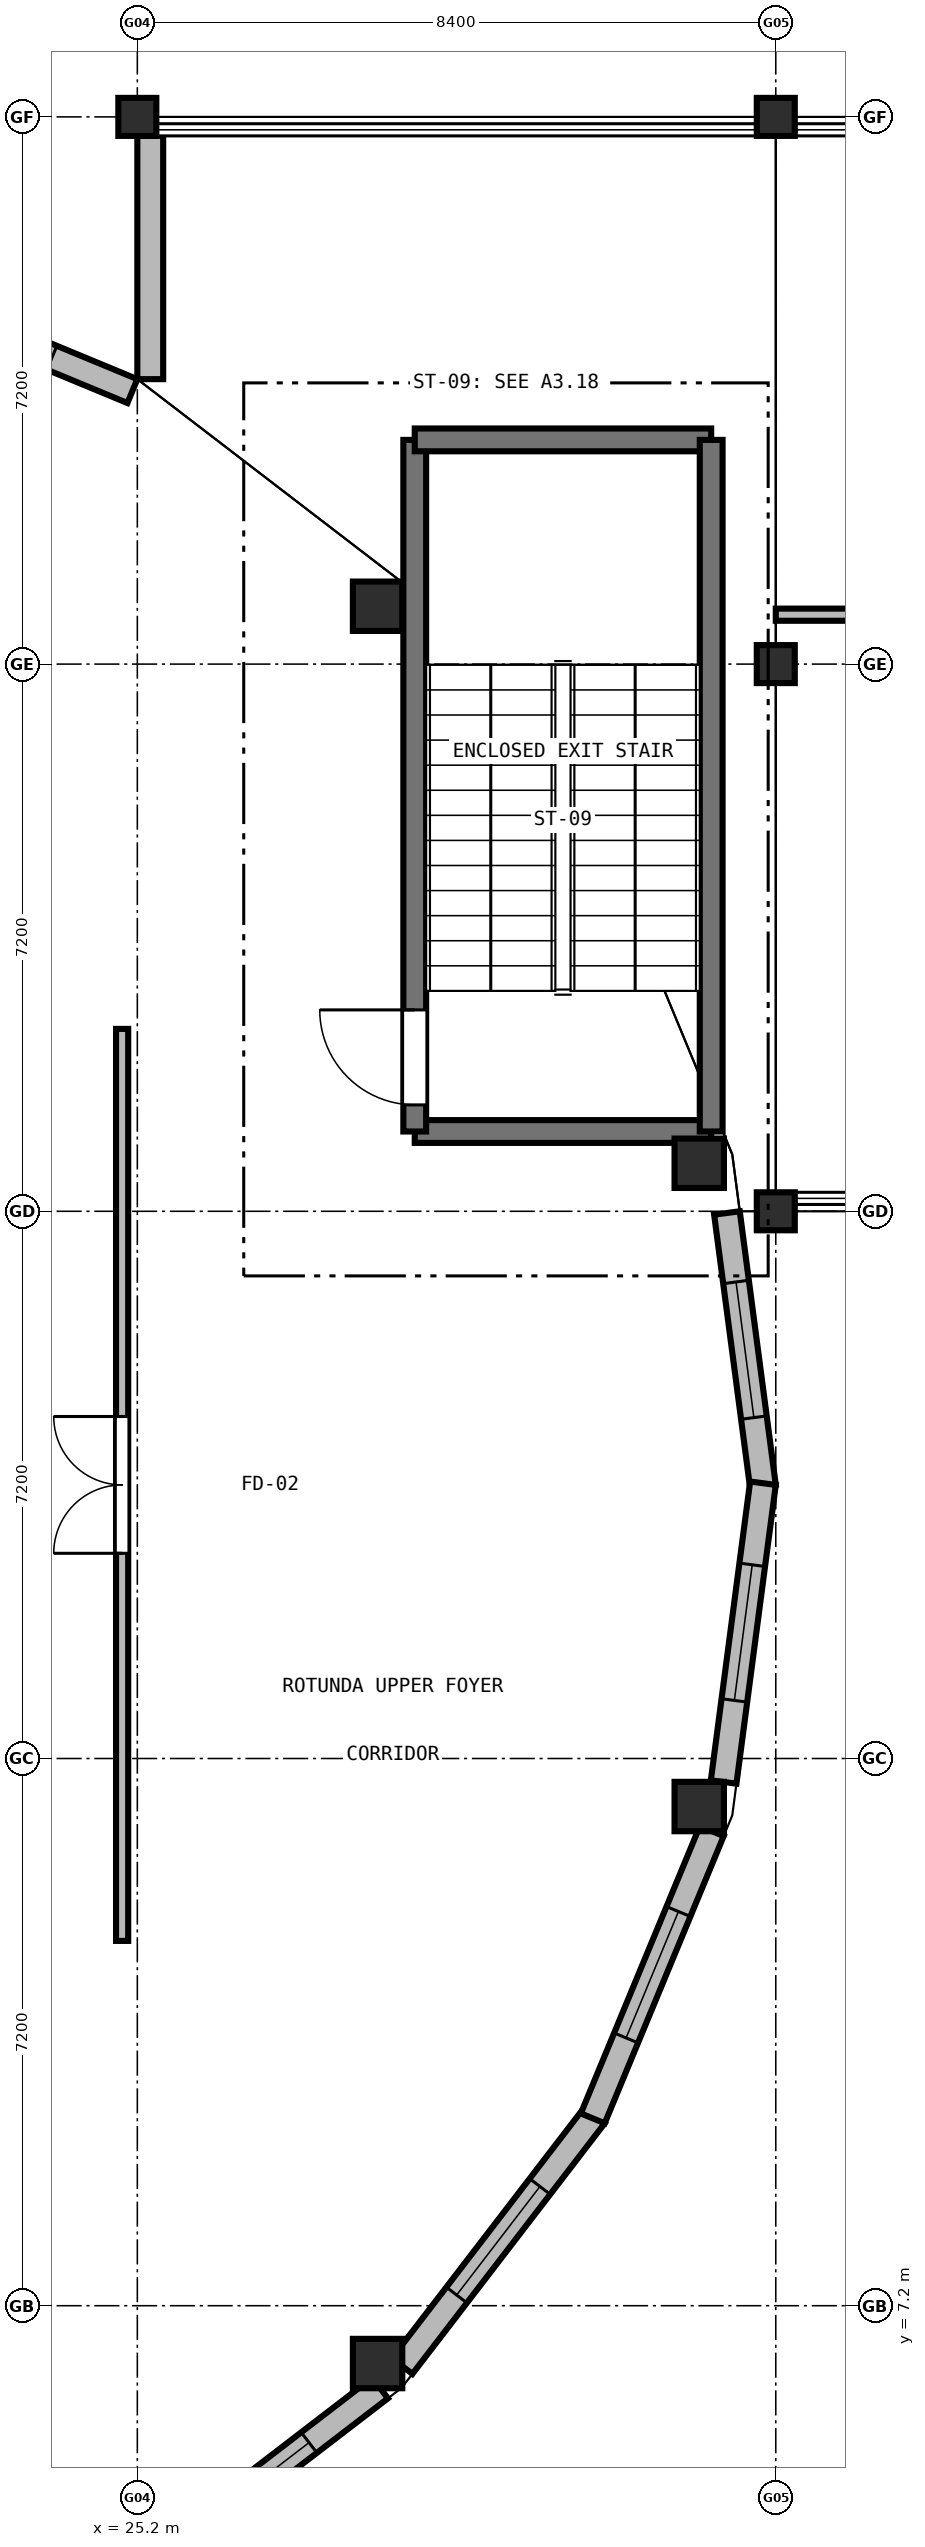
"""IFC4 building model, lengths in metres.
Left out: names, types, materials, properties, quantities, classifications, styles, units other than length and angle.
Written with IfcOpenShell. Run it as: python <this file> out.ifc"""

import sys

from ifc_helpers import new_model, si_unit, direction, frame, frame_2d, origin, origin_2d, place, context, subcontext, project, spatial, rectangle, circle, extrude, element, fill, save


model = new_model("IFC4")
c1 = context("Model", 3, precision=1e-05, world=origin(), true_north=direction((0.0, 1.0)))
c2 = subcontext(c1, "Body", "Model", "MODEL_VIEW")
j1 = project(units=[si_unit("LENGTHUNIT", "METRE"), si_unit("PLANEANGLEUNIT", "RADIAN")], contexts=[c1])
p1 = place(None, origin())
s1 = spatial("IfcSite", under=j1, at=p1, CompositionType="ELEMENT")
p2 = place(p1, origin())
s2 = spatial("IfcBuilding", under=s1, at=p2, CompositionType="ELEMENT")
p3 = place(p2, frame((0.0, 0.0, 5.1)))
s3 = spatial("IfcBuildingStorey", under=s2, at=p3, CompositionType="ELEMENT", Elevation=5.1)
p4 = place(p3, frame((25.2, 36.0, 0.0), z_axis=(0.0, 0.0, 1.0), x_axis=(1.0, 0.0, 0.0)))
e1 = element("IfcColumn", 1, at=p4, inside=s3, PredefinedType="COLUMN", context=c2, shape_type="SweptSolid", body=[
    extrude(rectangle(XDim=0.5, YDim=0.5, at=origin_2d()), origin(), (0.0, 0.0, 1.0), 4.2),
])
for number, where, z_axis, x_axis in (
    (2, (28.361, 6.439, 0.0), (0.0, 0.0, 1.0), (1.0, 0.0, 0.0)),
    (3, (28.361, 29.561, 0.0), (0.0, 0.0, 1.0), (1.0, 0.0, 0.0)),
    (4, (32.593, 13.768, 0.0), (0.0, 0.0, 1.0), (1.0, 0.0, 0.0)),
    (5, (32.593, 22.232, 0.0), (0.0, 0.0, 1.0), (1.0, 0.0, 0.0)),
):
    element("IfcColumn", number, at=place(p3, frame(where, z_axis=z_axis, x_axis=x_axis)), inside=s3, PredefinedType="COLUMN", context=c2, shape_type="SweptSolid", body=[
        extrude(circle(Radius=0.325, at=origin_2d()), origin(), (0.0, 0.0, 1.0), 4.2),
    ])
for number, where, z_axis, x_axis in (
    (6, (33.6, 21.6, 0.0), (0.0, 0.0, 1.0), (1.0, 0.0, 0.0)),
    (7, (33.6, 28.8, 0.0), (0.0, 0.0, 1.0), (1.0, 0.0, 0.0)),
    (8, (33.6, 36.0, 0.0), (0.0, 0.0, 1.0), (1.0, 0.0, 0.0)),
):
    element("IfcColumn", number, at=place(p3, frame(where, z_axis=z_axis, x_axis=x_axis)), inside=s3, PredefinedType="COLUMN", context=c2, shape_type="SweptSolid", body=[
        extrude(rectangle(XDim=0.5, YDim=0.5, at=origin_2d()), origin(), (0.0, 0.0, 1.0), 4.2),
    ])
p5 = place(p3, frame((31.214, 9.704, 0.0), z_axis=(0.0, 0.0, 1.0), x_axis=(-0.608750869434, -0.793361442826, 0.0)))
e9 = element("IfcWall", 9, at=p5, inside=s3, PredefinedType="SOLIDWALL", context=c2, shape_type="SweptSolid", body=[
    extrude(rectangle(XDim=4.156, YDim=0.34, at=frame_2d((2.078, 0.0))), origin(), (0.0, 0.0, 1.0), 2.96),
])
p6 = place(p5, frame((1.178, 0.0, 1.0)))
e10 = element("IfcOpeningElement", 10, at=p6, cuts=e9, PredefinedType="OPENING", context=c2, shape_type="SweptSolid", body=[
    extrude(rectangle(XDim=1.8, YDim=1.8, at=frame_2d((0.9, 0.9))), frame((0.0, 0.18, 0.0), z_axis=(0.0, -1.0, 0.0), x_axis=(1.0, 0.0, 0.0)), (0.0, 0.0, 1.0), 0.36),
])
p7 = place(p3, frame((28.394, 6.116, 0.0), z_axis=(0.0, 0.0, 1.0), x_axis=(-0.793361442826, -0.608750869434, 0.0)))
e11 = element("IfcWall", 11, at=p7, inside=s3, PredefinedType="SOLIDWALL", context=c2, shape_type="SweptSolid", body=[
    extrude(rectangle(XDim=4.156, YDim=0.34, at=frame_2d((2.078, 0.0))), origin(), (0.0, 0.0, 1.0), 2.96),
])
p8 = place(p7, frame((1.178, 0.0, 1.0)))
e12 = element("IfcOpeningElement", 12, at=p8, cuts=e11, PredefinedType="OPENING", context=c2, shape_type="SweptSolid", body=[
    extrude(rectangle(XDim=1.8, YDim=1.8, at=frame_2d((0.9, 0.9))), frame((0.0, 0.18, 0.0), z_axis=(0.0, -1.0, 0.0), x_axis=(1.0, 0.0, 0.0)), (0.0, 0.0, 1.0), 0.36),
])
p9 = place(p3, frame((21.355, 33.958, 0.0), z_axis=(0.0, 0.0, 1.0), x_axis=(0.923864101576, -0.382720683815, 0.0)))
e13 = element("IfcWall", 13, at=p9, inside=s3, PredefinedType="SOLIDWALL", context=c2, shape_type="SweptSolid", body=[
    extrude(rectangle(XDim=4.092, YDim=0.34, at=frame_2d((2.046, 0.0))), origin(), (0.0, 0.0, 1.0), 2.96),
])
p10 = place(p9, frame((1.146, 0.0, 1.0)))
e14 = element("IfcOpeningElement", 14, at=p10, cuts=e13, PredefinedType="OPENING", context=c2, shape_type="SweptSolid", body=[
    extrude(rectangle(XDim=1.8, YDim=1.8, at=frame_2d((0.9, 0.9))), frame((0.0, 0.18, 0.0), z_axis=(0.0, -1.0, 0.0), x_axis=(1.0, 0.0, 0.0)), (0.0, 0.0, 1.0), 0.36),
])
p11 = place(p3, frame((25.37, 32.549, 0.0), z_axis=(0.0, 0.0, 1.0), x_axis=(0.0, 1.0, 0.0)))
e15 = element("IfcWall", 15, at=p11, inside=s3, PredefinedType="SOLIDWALL", context=c2, shape_type="SweptSolid", body=[
    extrude(rectangle(XDim=3.203, YDim=0.34, at=frame_2d((1.601, 0.0))), origin(), (0.0, 0.0, 1.0), 3.86),
])
p12 = place(p3, frame((32.958, 21.578, 0.0), z_axis=(0.0, 0.0, 1.0), x_axis=(0.130503210904, -0.991447886651, 0.0)))
e16 = element("IfcWall", 16, at=p12, inside=s3, PredefinedType="SOLIDWALL", context=c2, shape_type="SweptSolid", body=[
    extrude(rectangle(XDim=3.631, YDim=0.34, at=frame_2d((1.815, 0.0))), origin(), (0.0, 0.0, 1.0), 2.96),
])
p13 = place(p12, frame((0.916, 0.0, 1.0)))
e17 = element("IfcOpeningElement", 17, at=p13, cuts=e16, PredefinedType="OPENING", context=c2, shape_type="SweptSolid", body=[
    extrude(rectangle(XDim=1.8, YDim=1.8, at=frame_2d((0.9, 0.9))), frame((0.0, 0.18, 0.0), z_axis=(0.0, -1.0, 0.0), x_axis=(1.0, 0.0, 0.0)), (0.0, 0.0, 1.0), 0.36),
])
p14 = place(p3, frame((33.431, 18.022, 0.0), z_axis=(0.0, 0.0, 1.0), x_axis=(-0.130534150104, -0.991443813666, 0.0)))
e18 = element("IfcWall", 18, at=p14, inside=s3, PredefinedType="SOLIDWALL", context=c2, shape_type="SweptSolid", body=[
    extrude(rectangle(XDim=3.965, YDim=0.34, at=frame_2d((1.982, 0.0))), origin(), (0.0, 0.0, 1.0), 2.96),
])
p15 = place(p14, frame((1.083, 0.0, 1.0)))
e19 = element("IfcOpeningElement", 19, at=p15, cuts=e18, PredefinedType="OPENING", context=c2, shape_type="SweptSolid", body=[
    extrude(rectangle(XDim=1.8, YDim=1.8, at=frame_2d((0.9, 0.9))), frame((0.0, 0.18, 0.0), z_axis=(0.0, -1.0, 0.0), x_axis=(1.0, 0.0, 0.0)), (0.0, 0.0, 1.0), 0.36),
])
p16 = place(p3, frame((32.758, 13.445, 0.0), z_axis=(0.0, 0.0, 1.0), x_axis=(-0.3826697526, -0.923885198737, 0.0)))
e20 = element("IfcWall", 20, at=p16, inside=s3, PredefinedType="SOLIDWALL", context=c2, shape_type="SweptSolid", body=[
    extrude(rectangle(XDim=4.092, YDim=0.34, at=frame_2d((2.046, 0.0))), origin(), (0.0, 0.0, 1.0), 2.96),
])
p17 = place(p16, frame((1.146, 0.0, 1.0)))
e21 = element("IfcOpeningElement", 21, at=p17, cuts=e20, PredefinedType="OPENING", context=c2, shape_type="SweptSolid", body=[
    extrude(rectangle(XDim=1.8, YDim=1.8, at=frame_2d((0.9, 0.9))), frame((0.0, 0.18, 0.0), z_axis=(0.0, -1.0, 0.0), x_axis=(1.0, 0.0, 0.0)), (0.0, 0.0, 1.0), 0.36),
])
p18 = place(p3, frame((32.75, 22.65, 0.0), z_axis=(0.0, 0.0, 1.0), x_axis=(-1.0, 0.0, 0.0)))
e22 = element("IfcWall", 22, at=p18, inside=s3, PredefinedType="SHEAR", context=c2, shape_type="SweptSolid", body=[
    extrude(rectangle(XDim=3.9, YDim=0.3, at=frame_2d((1.95, 0.0))), origin(), (0.0, 0.0, 1.0), 3.92),
])
p19 = place(p3, frame((28.85, 22.65, 0.0), z_axis=(0.0, 0.0, 1.0), x_axis=(0.0, 1.0, 0.0)))
e23 = element("IfcWall", 23, at=p19, inside=s3, PredefinedType="SHEAR", context=c2, shape_type="SweptSolid", body=[
    extrude(rectangle(XDim=9.1, YDim=0.3, at=frame_2d((4.55, 0.0))), origin(), (0.0, 0.0, 1.0), 3.92),
])
p20 = place(p19, frame((0.35, 0.0, 0.0)))
e24 = element("IfcOpeningElement", 24, at=p20, cuts=e23, PredefinedType="OPENING", context=c2, shape_type="SweptSolid", body=[
    extrude(rectangle(XDim=1.25, YDim=2.2, at=frame_2d((0.625, 1.1))), frame((0.0, 0.16, 0.0), z_axis=(0.0, -1.0, 0.0), x_axis=(1.0, 0.0, 0.0)), (0.0, 0.0, 1.0), 0.32),
])
p21 = place(p3, frame((28.85, 31.75, 0.0), z_axis=(0.0, 0.0, 1.0), x_axis=(1.0, 0.0, 0.0)))
e25 = element("IfcWall", 25, at=p21, inside=s3, PredefinedType="SHEAR", context=c2, shape_type="SweptSolid", body=[
    extrude(rectangle(XDim=3.9, YDim=0.3, at=frame_2d((1.95, 0.0))), origin(), (0.0, 0.0, 1.0), 3.92),
])
p22 = place(p3, frame((32.75, 31.75, 0.0), z_axis=(0.0, 0.0, 1.0), x_axis=(0.0, -1.0, 0.0)))
e26 = element("IfcWall", 26, at=p22, inside=s3, PredefinedType="SHEAR", context=c2, shape_type="SweptSolid", body=[
    extrude(rectangle(XDim=9.1, YDim=0.3, at=frame_2d((4.55, 0.0))), origin(), (0.0, 0.0, 1.0), 3.92),
])
p23 = place(p3, frame((50.18, 29.45, 0.0), z_axis=(0.0, 0.0, 1.0), x_axis=(-1.0, 0.0, 0.0)))
e27 = element("IfcWall", 27, at=p23, inside=s3, PredefinedType="PARTITIONING", context=c2, shape_type="SweptSolid", body=[
    extrude(rectangle(XDim=16.58, YDim=0.16, at=frame_2d((8.29, 0.0))), origin(), (0.0, 0.0, 1.0), 3.305),
])
p24 = place(p23, frame((5.153, 0.0, 0.0)))
e28 = element("IfcOpeningElement", 28, at=p24, cuts=e27, PredefinedType="OPENING", context=c2, shape_type="SweptSolid", body=[
    extrude(rectangle(XDim=1.3, YDim=2.15, at=frame_2d((0.65, 1.075))), frame((0.0, 0.09, 0.0), z_axis=(0.0, -1.0, 0.0), x_axis=(1.0, 0.0, 0.0)), (0.0, 0.0, 1.0), 0.18),
])
p25 = place(p3, frame((25.0, 12.0, 0.0), z_axis=(0.0, 0.0, 1.0), x_axis=(0.0, 1.0, 0.0)))
e29 = element("IfcWall", 29, at=p25, inside=s3, PredefinedType="PARTITIONING", context=c2, shape_type="SweptSolid", body=[
    extrude(rectangle(XDim=12.0, YDim=0.16, at=frame_2d((6.0, 0.0))), origin(), (0.0, 0.0, 1.0), 3.85),
])
p26 = place(p25, frame((5.1, 0.0, 0.0)))
e30 = element("IfcOpeningElement", 30, at=p26, cuts=e29, PredefinedType="OPENING", context=c2, shape_type="SweptSolid", body=[
    extrude(rectangle(XDim=1.8, YDim=2.2, at=frame_2d((0.9, 1.1))), frame((0.0, 0.09, 0.0), z_axis=(0.0, -1.0, 0.0), x_axis=(1.0, 0.0, 0.0)), (0.0, 0.0, 1.0), 0.18),
])
p27 = place(p6, origin())
e31 = element("IfcWindow", 31, at=p27, inside=s3, PartitioningType="SINGLE_PANEL", PredefinedType="WINDOW", context=c2, shape_type="SweptSolid", body=[
    extrude(rectangle(XDim=1.8, YDim=1.8, at=frame_2d((0.9, 0.9))), frame((0.0, 0.03, 0.0), z_axis=(0.0, -1.0, 0.0), x_axis=(1.0, 0.0, 0.0)), (0.0, 0.0, 1.0), 0.06),
])
fill(e10, e31)
p28 = place(p8, origin())
e32 = element("IfcWindow", 32, at=p28, inside=s3, PartitioningType="SINGLE_PANEL", PredefinedType="WINDOW", context=c2, shape_type="SweptSolid", body=[
    extrude(rectangle(XDim=1.8, YDim=1.8, at=frame_2d((0.9, 0.9))), frame((0.0, 0.03, 0.0), z_axis=(0.0, -1.0, 0.0), x_axis=(1.0, 0.0, 0.0)), (0.0, 0.0, 1.0), 0.06),
])
fill(e12, e32)
p29 = place(p10, origin())
e33 = element("IfcWindow", 33, at=p29, inside=s3, PartitioningType="SINGLE_PANEL", PredefinedType="WINDOW", context=c2, shape_type="SweptSolid", body=[
    extrude(rectangle(XDim=1.8, YDim=1.8, at=frame_2d((0.9, 0.9))), frame((0.0, 0.03, 0.0), z_axis=(0.0, -1.0, 0.0), x_axis=(1.0, 0.0, 0.0)), (0.0, 0.0, 1.0), 0.06),
])
fill(e14, e33)
p30 = place(p13, origin())
e34 = element("IfcWindow", 34, at=p30, inside=s3, PartitioningType="SINGLE_PANEL", PredefinedType="WINDOW", context=c2, shape_type="SweptSolid", body=[
    extrude(rectangle(XDim=1.8, YDim=1.8, at=frame_2d((0.9, 0.9))), frame((0.0, 0.03, 0.0), z_axis=(0.0, -1.0, 0.0), x_axis=(1.0, 0.0, 0.0)), (0.0, 0.0, 1.0), 0.06),
])
fill(e17, e34)
p31 = place(p15, origin())
e35 = element("IfcWindow", 35, at=p31, inside=s3, PartitioningType="SINGLE_PANEL", PredefinedType="WINDOW", context=c2, shape_type="SweptSolid", body=[
    extrude(rectangle(XDim=1.8, YDim=1.8, at=frame_2d((0.9, 0.9))), frame((0.0, 0.03, 0.0), z_axis=(0.0, -1.0, 0.0), x_axis=(1.0, 0.0, 0.0)), (0.0, 0.0, 1.0), 0.06),
])
fill(e19, e35)
p32 = place(p17, origin())
e36 = element("IfcWindow", 36, at=p32, inside=s3, PartitioningType="SINGLE_PANEL", PredefinedType="WINDOW", context=c2, shape_type="SweptSolid", body=[
    extrude(rectangle(XDim=1.8, YDim=1.8, at=frame_2d((0.9, 0.9))), frame((0.0, 0.03, 0.0), z_axis=(0.0, -1.0, 0.0), x_axis=(1.0, 0.0, 0.0)), (0.0, 0.0, 1.0), 0.06),
])
fill(e21, e36)
p33 = place(p20, origin())
e37 = element("IfcDoor", 37, at=p33, inside=s3, OperationType="SINGLE_SWING_RIGHT", PredefinedType="DOOR", context=c2, shape_type="SweptSolid", body=[
    extrude(rectangle(XDim=1.25, YDim=2.2, at=frame_2d((0.625, 1.1))), frame((0.0, 0.025, 0.0), z_axis=(0.0, -1.0, 0.0), x_axis=(1.0, 0.0, 0.0)), (0.0, 0.0, 1.0), 0.05),
])
fill(e24, e37)
p34 = place(p26, origin())
e38 = element("IfcDoor", 38, at=p34, inside=s3, OperationType="DOUBLE_DOOR_SINGLE_SWING", PredefinedType="DOOR", context=c2, shape_type="SweptSolid", body=[
    extrude(rectangle(XDim=1.8, YDim=2.2, at=frame_2d((0.9, 1.1))), frame((0.0, 0.025, 0.0), z_axis=(0.0, -1.0, 0.0), x_axis=(1.0, 0.0, 0.0)), (0.0, 0.0, 1.0), 0.05),
])
fill(e30, e38)
save(model, sys.argv[1])
